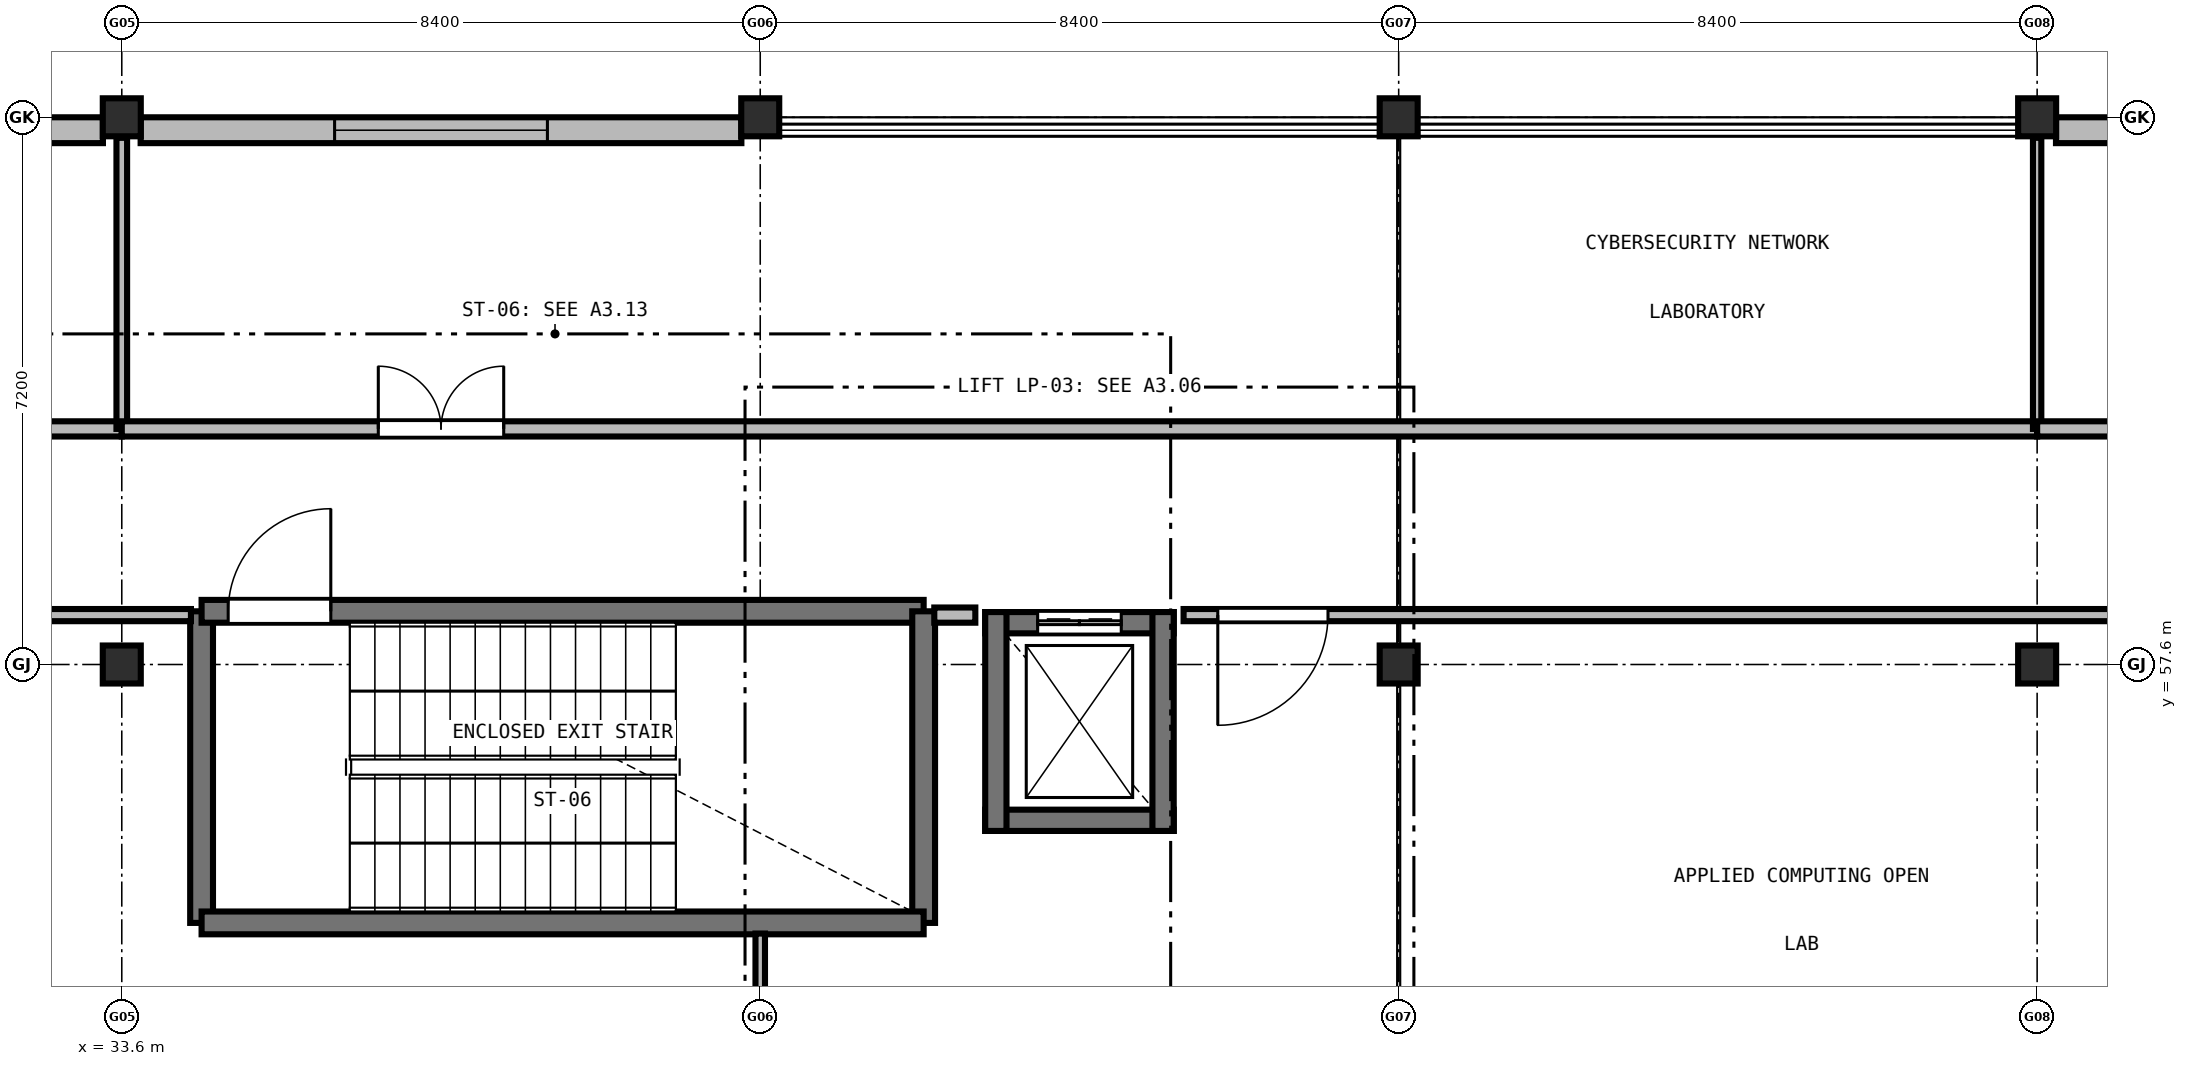
"""IFC4 building model, lengths in metres.
Left out: names, types, materials, properties, quantities, classifications, styles, units other than length and angle.
Written with IfcOpenShell. Run it as: python <this file> out.ifc"""

import sys

from ifc_helpers import new_model, si_unit, direction, frame, frame_2d, origin, origin_2d, place, context, subcontext, project, spatial, rectangle, extrude, element, fill, save


model = new_model("IFC4")
c1 = context("Model", 3, precision=1e-05, world=origin(), true_north=direction((0.0, 1.0)))
c2 = subcontext(c1, "Body", "Model", "MODEL_VIEW")
j1 = project(units=[si_unit("LENGTHUNIT", "METRE"), si_unit("PLANEANGLEUNIT", "RADIAN")], contexts=[c1])
p1 = place(None, origin())
s1 = spatial("IfcSite", under=j1, at=p1, CompositionType="ELEMENT")
p2 = place(p1, origin())
s2 = spatial("IfcBuilding", under=s1, at=p2, CompositionType="ELEMENT")
p3 = place(p2, frame((0.0, 0.0, 9.3)))
s3 = spatial("IfcBuildingStorey", under=s2, at=p3, CompositionType="ELEMENT", Elevation=9.3)
for number, where, z_axis, x_axis in (
    (1, (33.6, 57.6, 0.0), (0.0, 0.0, 1.0), (1.0, 0.0, 0.0)),
    (2, (33.6, 64.8, 0.0), (0.0, 0.0, 1.0), (1.0, 0.0, 0.0)),
    (3, (42.0, 64.8, 0.0), (0.0, 0.0, 1.0), (1.0, 0.0, 0.0)),
    (4, (50.4, 57.6, 0.0), (0.0, 0.0, 1.0), (1.0, 0.0, 0.0)),
    (5, (50.4, 64.8, 0.0), (0.0, 0.0, 1.0), (1.0, 0.0, 0.0)),
    (6, (58.8, 57.6, 0.0), (0.0, 0.0, 1.0), (1.0, 0.0, 0.0)),
    (7, (58.8, 64.8, 0.0), (0.0, 0.0, 1.0), (1.0, 0.0, 0.0)),
):
    element("IfcColumn", number, at=place(p3, frame(where, z_axis=z_axis, x_axis=x_axis)), inside=s3, PredefinedType="COLUMN", context=c2, shape_type="SweptSolid", body=[
        extrude(rectangle(XDim=0.5, YDim=0.5, at=origin_2d()), origin(), (0.0, 0.0, 1.0), 4.2),
    ])
p4 = place(p3, frame((25.448, 64.63, 0.0), z_axis=(0.0, 0.0, 1.0), x_axis=(1.0, 0.0, 0.0)))
e8 = element("IfcWall", 8, at=p4, inside=s3, PredefinedType="SOLIDWALL", context=c2, shape_type="SweptSolid", body=[
    extrude(rectangle(XDim=7.904, YDim=0.34, at=frame_2d((3.952, 0.0))), origin(), (0.0, 0.0, 1.0), 3.18),
])
p5 = place(p4, frame((2.352, 0.0, 0.95)))
e9 = element("IfcOpeningElement", 9, at=p5, cuts=e8, PredefinedType="OPENING", context=c2, shape_type="SweptSolid", body=[
    extrude(rectangle(XDim=3.2, YDim=1.98, at=frame_2d((1.6, 0.99))), frame((0.0, 0.18, 0.0), z_axis=(0.0, -1.0, 0.0), x_axis=(1.0, 0.0, 0.0)), (0.0, 0.0, 1.0), 0.36),
])
p6 = place(p3, frame((33.848, 64.63, 0.0), z_axis=(0.0, 0.0, 1.0), x_axis=(1.0, 0.0, 0.0)))
e10 = element("IfcWall", 10, at=p6, inside=s3, PredefinedType="SOLIDWALL", context=c2, shape_type="SweptSolid", body=[
    extrude(rectangle(XDim=7.904, YDim=0.34, at=frame_2d((3.952, 0.0))), origin(), (0.0, 0.0, 1.0), 3.18),
])
p7 = place(p6, frame((2.552, 0.0, 0.95)))
e11 = element("IfcOpeningElement", 11, at=p7, cuts=e10, PredefinedType="OPENING", context=c2, shape_type="SweptSolid", body=[
    extrude(rectangle(XDim=2.8, YDim=1.98, at=frame_2d((1.4, 0.99))), frame((0.0, 0.18, 0.0), z_axis=(0.0, -1.0, 0.0), x_axis=(1.0, 0.0, 0.0)), (0.0, 0.0, 1.0), 0.36),
])
p8 = place(p3, frame((59.048, 64.63, 0.0), z_axis=(0.0, 0.0, 1.0), x_axis=(1.0, 0.0, 0.0)))
e12 = element("IfcWall", 12, at=p8, inside=s3, PredefinedType="SOLIDWALL", context=c2, shape_type="SweptSolid", body=[
    extrude(rectangle(XDim=7.904, YDim=0.34, at=frame_2d((3.952, 0.0))), origin(), (0.0, 0.0, 1.0), 3.18),
])
p9 = place(p8, frame((0.901, 0.0, 0.95)))
e13 = element("IfcOpeningElement", 13, at=p9, cuts=e12, PredefinedType="OPENING", context=c2, shape_type="SweptSolid", body=[
    extrude(rectangle(XDim=2.6, YDim=1.8, at=frame_2d((1.3, 0.9))), frame((0.0, 0.18, 0.0), z_axis=(0.0, -1.0, 0.0), x_axis=(1.0, 0.0, 0.0)), (0.0, 0.0, 1.0), 0.36),
])
p10 = place(p8, frame((4.403, 0.0, 0.95)))
e14 = element("IfcOpeningElement", 14, at=p10, cuts=e12, PredefinedType="OPENING", context=c2, shape_type="SweptSolid", body=[
    extrude(rectangle(XDim=2.6, YDim=1.8, at=frame_2d((1.3, 0.9))), frame((0.0, 0.18, 0.0), z_axis=(0.0, -1.0, 0.0), x_axis=(1.0, 0.0, 0.0)), (0.0, 0.0, 1.0), 0.36),
])
p11 = place(p3, frame((34.65, 54.2, 0.0), z_axis=(0.0, 0.0, 1.0), x_axis=(0.0, 1.0, 0.0)))
e15 = element("IfcWall", 15, at=p11, inside=s3, PredefinedType="SHEAR", context=c2, shape_type="SweptSolid", body=[
    extrude(rectangle(XDim=4.1, YDim=0.3, at=frame_2d((2.05, 0.0))), origin(), (0.0, 0.0, 1.0), 3.94),
])
p12 = place(p3, frame((34.65, 58.3, 0.0), z_axis=(0.0, 0.0, 1.0), x_axis=(1.0, 0.0, 0.0)))
e16 = element("IfcWall", 16, at=p12, inside=s3, PredefinedType="SHEAR", context=c2, shape_type="SweptSolid", body=[
    extrude(rectangle(XDim=9.5, YDim=0.3, at=frame_2d((4.75, 0.0))), origin(), (0.0, 0.0, 1.0), 3.94),
])
p13 = place(p12, frame((0.35, 0.0, 0.0)))
e17 = element("IfcOpeningElement", 17, at=p13, cuts=e16, PredefinedType="OPENING", context=c2, shape_type="SweptSolid", body=[
    extrude(rectangle(XDim=1.35, YDim=2.2, at=frame_2d((0.675, 1.1))), frame((0.0, 0.16, 0.0), z_axis=(0.0, -1.0, 0.0), x_axis=(1.0, 0.0, 0.0)), (0.0, 0.0, 1.0), 0.32),
])
p14 = place(p3, frame((44.15, 58.3, 0.0), z_axis=(0.0, 0.0, 1.0), x_axis=(0.0, -1.0, 0.0)))
e18 = element("IfcWall", 18, at=p14, inside=s3, PredefinedType="SHEAR", context=c2, shape_type="SweptSolid", body=[
    extrude(rectangle(XDim=4.1, YDim=0.3, at=frame_2d((2.05, 0.0))), origin(), (0.0, 0.0, 1.0), 3.94),
])
p15 = place(p3, frame((44.15, 54.2, 0.0), z_axis=(0.0, 0.0, 1.0), x_axis=(-1.0, 0.0, 0.0)))
e19 = element("IfcWall", 19, at=p15, inside=s3, PredefinedType="SHEAR", context=c2, shape_type="SweptSolid", body=[
    extrude(rectangle(XDim=9.5, YDim=0.3, at=frame_2d((4.75, 0.0))), origin(), (0.0, 0.0, 1.0), 3.94),
])
p16 = place(p3, frame((47.44, 55.55, 0.0), z_axis=(0.0, 0.0, 1.0), x_axis=(-1.0, 0.0, 0.0)))
e20 = element("IfcWall", 20, at=p16, inside=s3, PredefinedType="SHEAR", context=c2, shape_type="SweptSolid", body=[
    extrude(rectangle(XDim=2.48, YDim=0.28, at=frame_2d((1.24, 0.0))), origin(), (0.0, 0.0, 1.0), 3.94),
])
p17 = place(p3, frame((44.96, 58.15, 0.0), z_axis=(0.0, 0.0, 1.0), x_axis=(1.0, 0.0, 0.0)))
e21 = element("IfcWall", 21, at=p17, inside=s3, PredefinedType="SHEAR", context=c2, shape_type="SweptSolid", body=[
    extrude(rectangle(XDim=2.48, YDim=0.28, at=frame_2d((1.24, 0.0))), origin(), (0.0, 0.0, 1.0), 3.94),
])
p18 = place(p17, frame((0.69, 0.0, 0.0)))
e22 = element("IfcOpeningElement", 22, at=p18, cuts=e21, PredefinedType="OPENING", context=c2, shape_type="SweptSolid", body=[
    extrude(rectangle(XDim=1.1, YDim=2.15, at=frame_2d((0.55, 1.075))), frame((0.0, 0.15, 0.0), z_axis=(0.0, -1.0, 0.0), x_axis=(1.0, 0.0, 0.0)), (0.0, 0.0, 1.0), 0.3),
])
for number, where, z_axis, x_axis in (
    (23, (45.1, 55.41, 0.0), (0.0, 0.0, 1.0), (0.0, 1.0, 0.0)),
    (24, (47.3, 58.29, 0.0), (0.0, 0.0, 1.0), (0.0, -1.0, 0.0)),
):
    element("IfcWall", number, at=place(p3, frame(where, z_axis=z_axis, x_axis=x_axis)), inside=s3, PredefinedType="SHEAR", context=c2, shape_type="SweptSolid", body=[
        extrude(rectangle(XDim=2.88, YDim=0.28, at=frame_2d((1.44, 0.0))), origin(), (0.0, 0.0, 1.0), 3.94),
    ])
p19 = place(p3, frame((8.62, 60.7, 0.0), z_axis=(0.0, 0.0, 1.0), x_axis=(1.0, 0.0, 0.0)))
e25 = element("IfcWall", 25, at=p19, inside=s3, PredefinedType="SOLIDWALL", context=c2, shape_type="SweptSolid", body=[
    extrude(rectangle(XDim=24.98, YDim=0.2, at=frame_2d((12.49, 0.0))), origin(), (0.0, 0.0, 1.0), 3.325),
])
p20 = place(p19, frame((3.405, 0.0, 0.0)))
e26 = element("IfcOpeningElement", 26, at=p20, cuts=e25, PredefinedType="OPENING", context=c2, shape_type="SweptSolid", body=[
    extrude(rectangle(XDim=1.15, YDim=2.15, at=frame_2d((0.575, 1.075))), frame((0.0, 0.11, 0.0), z_axis=(0.0, -1.0, 0.0), x_axis=(1.0, 0.0, 0.0)), (0.0, 0.0, 1.0), 0.22),
])
p21 = place(p3, frame((33.6, 60.7, 0.0), z_axis=(0.0, 0.0, 1.0), x_axis=(0.0, 1.0, 0.0)))
e27 = element("IfcWall", 27, at=p21, inside=s3, PredefinedType="PARTITIONING", context=c2, shape_type="SweptSolid", body=[
    extrude(rectangle(XDim=3.83, YDim=0.14, at=frame_2d((1.915, 0.0))), origin(), (0.0, 0.0, 1.0), 3.175),
])
p22 = place(p3, frame((33.6, 60.7, 0.0), z_axis=(0.0, 0.0, 1.0), x_axis=(1.0, 0.0, 0.0)))
e28 = element("IfcWall", 28, at=p22, inside=s3, PredefinedType="SOLIDWALL", context=c2, shape_type="SweptSolid", body=[
    extrude(rectangle(XDim=25.2, YDim=0.2, at=frame_2d((12.6, 0.0))), origin(), (0.0, 0.0, 1.0), 3.325),
])
p23 = place(p22, frame((3.375, 0.0, 0.0)))
e29 = element("IfcOpeningElement", 29, at=p23, cuts=e28, PredefinedType="OPENING", context=c2, shape_type="SweptSolid", body=[
    extrude(rectangle(XDim=1.65, YDim=2.2, at=frame_2d((0.825, 1.1))), frame((0.0, 0.11, 0.0), z_axis=(0.0, -1.0, 0.0), x_axis=(1.0, 0.0, 0.0)), (0.0, 0.0, 1.0), 0.22),
])
p24 = place(p3, frame((58.8, 60.7, 0.0), z_axis=(0.0, 0.0, 1.0), x_axis=(0.0, 1.0, 0.0)))
e30 = element("IfcWall", 30, at=p24, inside=s3, PredefinedType="PARTITIONING", context=c2, shape_type="SweptSolid", body=[
    extrude(rectangle(XDim=3.83, YDim=0.11, at=frame_2d((1.915, 0.0))), origin(), (0.0, 0.0, 1.0), 3.175),
])
p25 = place(p3, frame((58.8, 60.7, 0.0), z_axis=(0.0, 0.0, 1.0), x_axis=(1.0, 0.0, 0.0)))
e31 = element("IfcWall", 31, at=p25, inside=s3, PredefinedType="SOLIDWALL", context=c2, shape_type="SweptSolid", body=[
    extrude(rectangle(XDim=42.0, YDim=0.2, at=frame_2d((21.0, 0.0))), origin(), (0.0, 0.0, 1.0), 3.325),
])
p26 = place(p25, frame((3.55, 0.0, 0.0)))
e32 = element("IfcOpeningElement", 32, at=p26, cuts=e31, PredefinedType="OPENING", context=c2, shape_type="SweptSolid", body=[
    extrude(rectangle(XDim=1.3, YDim=2.15, at=frame_2d((0.65, 1.075))), frame((0.0, 0.11, 0.0), z_axis=(0.0, -1.0, 0.0), x_axis=(1.0, 0.0, 0.0)), (0.0, 0.0, 1.0), 0.22),
])
p27 = place(p3, frame((34.51, 58.25, 0.0), z_axis=(0.0, 0.0, 1.0), x_axis=(-1.0, 0.0, 0.0)))
e33 = element("IfcWall", 33, at=p27, inside=s3, PredefinedType="PARTITIONING", context=c2, shape_type="SweptSolid", body=[
    extrude(rectangle(XDim=25.89, YDim=0.16, at=frame_2d((12.945, 0.0))), origin(), (0.0, 0.0, 1.0), 3.325),
])
p28 = place(p27, frame((21.41, 0.0, 0.0)))
e34 = element("IfcOpeningElement", 34, at=p28, cuts=e33, PredefinedType="OPENING", context=c2, shape_type="SweptSolid", body=[
    extrude(rectangle(XDim=1.0, YDim=2.1, at=frame_2d((0.5, 1.05))), frame((0.0, 0.09, 0.0), z_axis=(0.0, -1.0, 0.0), x_axis=(1.0, 0.0, 0.0)), (0.0, 0.0, 1.0), 0.18),
])
p29 = place(p3, frame((42.0, 50.62, 0.0), z_axis=(0.0, 0.0, 1.0), x_axis=(0.0, 1.0, 0.0)))
e35 = element("IfcWall", 35, at=p29, inside=s3, PredefinedType="PARTITIONING", context=c2, shape_type="SweptSolid", body=[
    extrude(rectangle(XDim=3.44, YDim=0.125, at=frame_2d((1.72, 0.0))), origin(), (0.0, 0.0, 1.0), 3.175),
])
p30 = place(p3, frame((93.31, 58.25, 0.0), z_axis=(0.0, 0.0, 1.0), x_axis=(-1.0, 0.0, 0.0)))
e36 = element("IfcWall", 36, at=p30, inside=s3, PredefinedType="PARTITIONING", context=c2, shape_type="SweptSolid", body=[
    extrude(rectangle(XDim=45.74, YDim=0.16, at=frame_2d((22.87, 0.0))), origin(), (0.0, 0.0, 1.0), 3.325),
])
p31 = place(p30, frame((43.84, 0.0, 0.0)))
e37 = element("IfcOpeningElement", 37, at=p31, cuts=e36, PredefinedType="OPENING", context=c2, shape_type="SweptSolid", body=[
    extrude(rectangle(XDim=1.45, YDim=2.2, at=frame_2d((0.725, 1.1))), frame((0.0, 0.09, 0.0), z_axis=(0.0, -1.0, 0.0), x_axis=(1.0, 0.0, 0.0)), (0.0, 0.0, 1.0), 0.18),
])
p32 = place(p3, frame((44.83, 58.25, 0.0), z_axis=(0.0, 0.0, 1.0), x_axis=(-1.0, 0.0, 0.0)))
e38 = element("IfcWall", 38, at=p32, inside=s3, PredefinedType="SOLIDWALL", context=c2, shape_type="SweptSolid", body=[
    extrude(rectangle(XDim=0.54, YDim=0.2, at=frame_2d((0.27, 0.0))), origin(), (0.0, 0.0, 1.0), 3.85),
])
p33 = place(p7, origin())
e39 = element("IfcWindow", 39, at=p33, inside=s3, PartitioningType="SINGLE_PANEL", PredefinedType="WINDOW", context=c2, shape_type="SweptSolid", body=[
    extrude(rectangle(XDim=2.8, YDim=1.98, at=frame_2d((1.4, 0.99))), frame((0.0, 0.03, 0.0), z_axis=(0.0, -1.0, 0.0), x_axis=(1.0, 0.0, 0.0)), (0.0, 0.0, 1.0), 0.06),
])
fill(e11, e39)
p34 = place(p13, origin())
e40 = element("IfcDoor", 40, at=p34, inside=s3, OperationType="SINGLE_SWING_RIGHT", PredefinedType="DOOR", context=c2, shape_type="SweptSolid", body=[
    extrude(rectangle(XDim=1.35, YDim=2.2, at=frame_2d((0.675, 1.1))), frame((0.0, 0.025, 0.0), z_axis=(0.0, -1.0, 0.0), x_axis=(1.0, 0.0, 0.0)), (0.0, 0.0, 1.0), 0.05),
])
fill(e17, e40)
p35 = place(p18, origin())
e41 = element("IfcDoor", 41, at=p35, inside=s3, OperationType="DOUBLE_DOOR_SLIDING", PredefinedType="DOOR", context=c2, shape_type="SweptSolid", body=[
    extrude(rectangle(XDim=1.1, YDim=2.15, at=frame_2d((0.55, 1.075))), frame((0.0, 0.025, 0.0), z_axis=(0.0, -1.0, 0.0), x_axis=(1.0, 0.0, 0.0)), (0.0, 0.0, 1.0), 0.05),
])
fill(e22, e41)
p36 = place(p23, origin())
e42 = element("IfcDoor", 42, at=p36, inside=s3, OperationType="DOUBLE_DOOR_SINGLE_SWING", PredefinedType="DOOR", context=c2, shape_type="SweptSolid", body=[
    extrude(rectangle(XDim=1.65, YDim=2.2, at=frame_2d((0.825, 1.1))), frame((0.0, 0.025, 0.0), z_axis=(0.0, -1.0, 0.0), x_axis=(1.0, 0.0, 0.0)), (0.0, 0.0, 1.0), 0.05),
])
fill(e29, e42)
p37 = place(p31, origin())
e43 = element("IfcDoor", 43, at=p37, inside=s3, OperationType="SINGLE_SWING_RIGHT", PredefinedType="DOOR", context=c2, shape_type="SweptSolid", body=[
    extrude(rectangle(XDim=1.45, YDim=2.2, at=frame_2d((0.725, 1.1))), frame((0.0, 0.025, 0.0), z_axis=(0.0, -1.0, 0.0), x_axis=(1.0, 0.0, 0.0)), (0.0, 0.0, 1.0), 0.05),
])
fill(e37, e43)
save(model, sys.argv[1])
